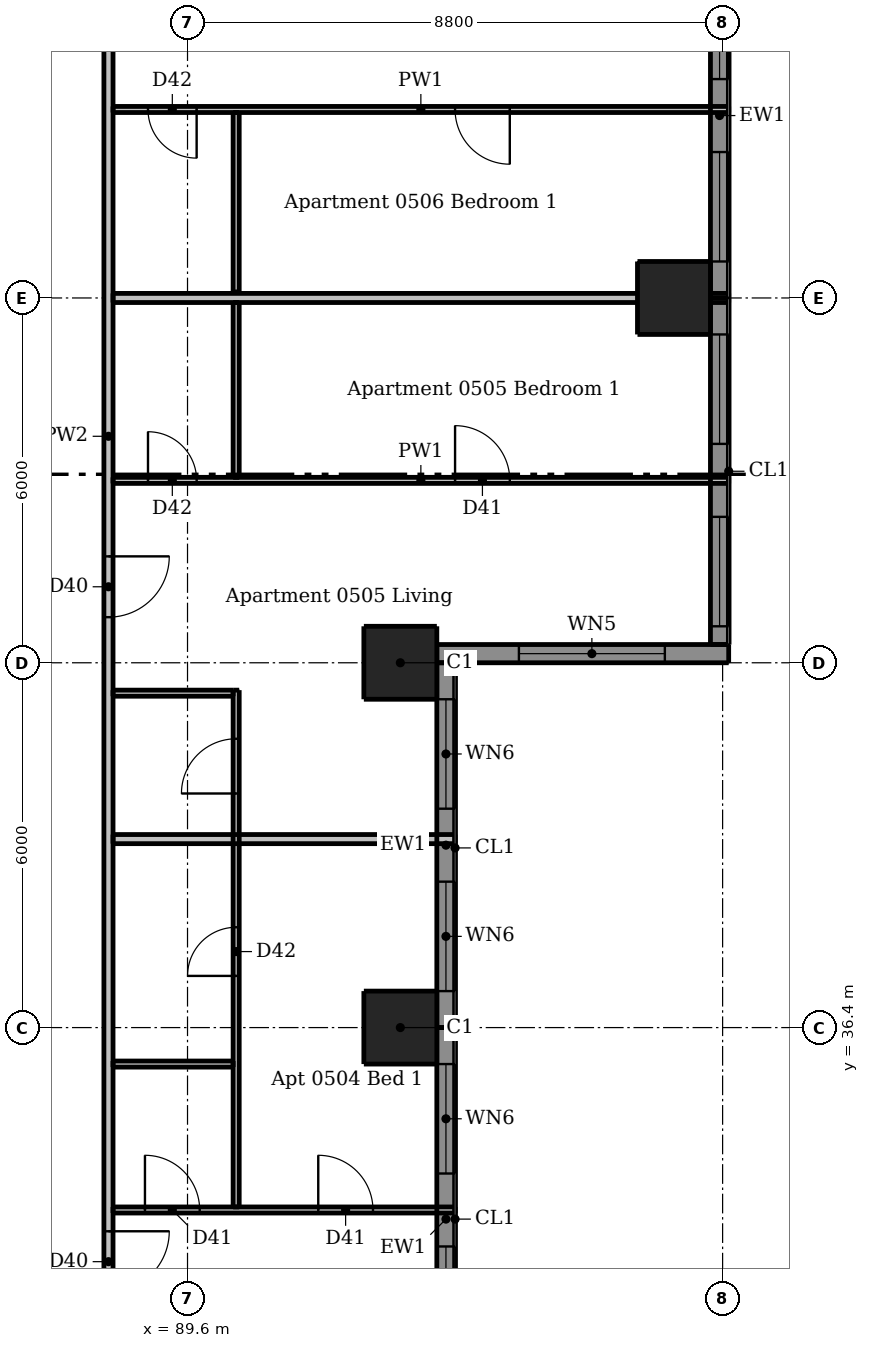
"""IFC4 building model, lengths in metres.
Left out: names, types, materials, properties, quantities, classifications, styles, units other than length and angle.
Written with IfcOpenShell. Run it as: python <this file> out.ifc"""

import sys

from ifc_helpers import new_model, si_unit, direction, frame, frame_2d, origin, origin_2d, place, context, subcontext, project, spatial, rectangle, extrude, element, fill, save


model = new_model("IFC4")
c1 = context("Model", 3, precision=1e-05, world=origin(), true_north=direction((0.0, 1.0)))
c2 = subcontext(c1, "Body", "Model", "MODEL_VIEW")
j1 = project(units=[si_unit("LENGTHUNIT", "METRE"), si_unit("PLANEANGLEUNIT", "RADIAN")], contexts=[c1])
p1 = place(None, origin())
s1 = spatial("IfcSite", under=j1, at=p1, CompositionType="ELEMENT")
p2 = place(p1, origin())
s2 = spatial("IfcBuilding", under=s1, at=p2, CompositionType="ELEMENT")
p3 = place(p2, frame((0.0, 0.0, 23.5)))
s3 = spatial("IfcBuildingStorey", under=s2, at=p3, CompositionType="ELEMENT", Elevation=23.5)
for number, where, z_axis, x_axis in (
    (1, (93.1, 36.4, 0.0), (0.0, 0.0, 1.0), (1.0, 0.0, 0.0)),
    (2, (93.1, 42.4, 0.0), (0.0, 0.0, 1.0), (1.0, 0.0, 0.0)),
    (3, (97.6, 48.4, 0.0), (0.0, 0.0, 1.0), (1.0, 0.0, 0.0)),
):
    element("IfcColumn", number, at=place(p3, frame(where, z_axis=z_axis, x_axis=x_axis)), inside=s3, PredefinedType="COLUMN", context=c2, shape_type="SweptSolid", body=[
        extrude(rectangle(XDim=1.2, YDim=1.2, at=origin_2d()), origin(), (0.0, 0.0, 1.0), 3.05),
    ])
p4 = place(p3, frame((93.7, 42.55, 0.0), z_axis=(0.0, 0.0, 1.0), x_axis=(1.0, 0.0, 0.0)))
e4 = element("IfcWall", 4, at=p4, inside=s3, PredefinedType="SOLIDWALL", context=c2, shape_type="SweptSolid", body=[
    extrude(rectangle(XDim=4.8, YDim=0.3, at=frame_2d((2.4, 0.0))), origin(), (0.0, 0.0, 1.0), 3.05),
])
p5 = place(p4, frame((1.35, 0.0, 0.15)))
e5 = element("IfcOpeningElement", 5, at=p5, cuts=e4, PredefinedType="OPENING", context=c2, shape_type="SweptSolid", body=[
    extrude(rectangle(XDim=2.4, YDim=2.1, at=frame_2d((1.2, 1.05))), frame((0.0, 0.16, 0.0), z_axis=(0.0, -1.0, 0.0), x_axis=(1.0, 0.0, 0.0)), (0.0, 0.0, 1.0), 0.32),
])
p6 = place(p3, frame((93.85, 30.1, 0.0), z_axis=(0.0, 0.0, 1.0), x_axis=(0.0, 1.0, 0.0)))
e6 = element("IfcWall", 6, at=p6, inside=s3, PredefinedType="SOLIDWALL", context=c2, shape_type="SweptSolid", body=[
    extrude(rectangle(XDim=6.3, YDim=0.3, at=frame_2d((3.15, 0.0))), origin(), (0.0, 0.0, 1.0), 3.05),
])
p7 = place(p6, frame((0.9, 0.0, 0.15)))
e7 = element("IfcOpeningElement", 7, at=p7, cuts=e6, PredefinedType="OPENING", context=c2, shape_type="SweptSolid", body=[
    extrude(rectangle(XDim=1.8, YDim=2.1, at=frame_2d((0.9, 1.05))), frame((0.0, 0.16, 0.0), z_axis=(0.0, -1.0, 0.0), x_axis=(1.0, 0.0, 0.0)), (0.0, 0.0, 1.0), 0.32),
])
p8 = place(p6, frame((3.9, 0.0, 0.15)))
e8 = element("IfcOpeningElement", 8, at=p8, cuts=e6, PredefinedType="OPENING", context=c2, shape_type="SweptSolid", body=[
    extrude(rectangle(XDim=1.8, YDim=2.1, at=frame_2d((0.9, 1.05))), frame((0.0, 0.16, 0.0), z_axis=(0.0, -1.0, 0.0), x_axis=(1.0, 0.0, 0.0)), (0.0, 0.0, 1.0), 0.32),
])
p9 = place(p3, frame((93.85, 36.4, 0.0), z_axis=(0.0, 0.0, 1.0), x_axis=(0.0, 1.0, 0.0)))
e9 = element("IfcWall", 9, at=p9, inside=s3, PredefinedType="SOLIDWALL", context=c2, shape_type="SweptSolid", body=[
    extrude(rectangle(XDim=6.0, YDim=0.3, at=frame_2d((3.0, 0.0))), origin(), (0.0, 0.0, 1.0), 3.05),
])
p10 = place(p9, frame((0.6, 0.0, 0.15)))
e10 = element("IfcOpeningElement", 10, at=p10, cuts=e9, PredefinedType="OPENING", context=c2, shape_type="SweptSolid", body=[
    extrude(rectangle(XDim=1.8, YDim=2.1, at=frame_2d((0.9, 1.05))), frame((0.0, 0.16, 0.0), z_axis=(0.0, -1.0, 0.0), x_axis=(1.0, 0.0, 0.0)), (0.0, 0.0, 1.0), 0.32),
])
p11 = place(p9, frame((3.6, 0.0, 0.15)))
e11 = element("IfcOpeningElement", 11, at=p11, cuts=e9, PredefinedType="OPENING", context=c2, shape_type="SweptSolid", body=[
    extrude(rectangle(XDim=1.8, YDim=2.1, at=frame_2d((0.9, 1.05))), frame((0.0, 0.16, 0.0), z_axis=(0.0, -1.0, 0.0), x_axis=(1.0, 0.0, 0.0)), (0.0, 0.0, 1.0), 0.32),
])
p12 = place(p3, frame((98.35, 42.7, 0.0), z_axis=(0.0, 0.0, 1.0), x_axis=(0.0, 1.0, 0.0)))
e12 = element("IfcWall", 12, at=p12, inside=s3, PredefinedType="SOLIDWALL", context=c2, shape_type="SweptSolid", body=[
    extrude(rectangle(XDim=5.7, YDim=0.3, at=frame_2d((2.85, 0.0))), origin(), (0.0, 0.0, 1.0), 3.05),
])
p13 = place(p12, frame((0.3, 0.0, 0.15)))
e13 = element("IfcOpeningElement", 13, at=p13, cuts=e12, PredefinedType="OPENING", context=c2, shape_type="SweptSolid", body=[
    extrude(rectangle(XDim=1.8, YDim=2.1, at=frame_2d((0.9, 1.05))), frame((0.0, 0.16, 0.0), z_axis=(0.0, -1.0, 0.0), x_axis=(1.0, 0.0, 0.0)), (0.0, 0.0, 1.0), 0.32),
])
p14 = place(p12, frame((3.3, 0.0, 0.15)))
e14 = element("IfcOpeningElement", 14, at=p14, cuts=e12, PredefinedType="OPENING", context=c2, shape_type="SweptSolid", body=[
    extrude(rectangle(XDim=1.8, YDim=2.1, at=frame_2d((0.9, 1.05))), frame((0.0, 0.16, 0.0), z_axis=(0.0, -1.0, 0.0), x_axis=(1.0, 0.0, 0.0)), (0.0, 0.0, 1.0), 0.32),
])
p15 = place(p3, frame((98.35, 48.4, 0.0), z_axis=(0.0, 0.0, 1.0), x_axis=(0.0, 1.0, 0.0)))
e15 = element("IfcWall", 15, at=p15, inside=s3, PredefinedType="SOLIDWALL", context=c2, shape_type="SweptSolid", body=[
    extrude(rectangle(XDim=6.0, YDim=0.3, at=frame_2d((3.0, 0.0))), origin(), (0.0, 0.0, 1.0), 3.05),
])
p16 = place(p15, frame((0.6, 0.0, 0.15)))
e16 = element("IfcOpeningElement", 16, at=p16, cuts=e15, PredefinedType="OPENING", context=c2, shape_type="SweptSolid", body=[
    extrude(rectangle(XDim=1.8, YDim=2.1, at=frame_2d((0.9, 1.05))), frame((0.0, 0.16, 0.0), z_axis=(0.0, -1.0, 0.0), x_axis=(1.0, 0.0, 0.0)), (0.0, 0.0, 1.0), 0.32),
])
p17 = place(p15, frame((3.6, 0.0, 0.15)))
e17 = element("IfcOpeningElement", 17, at=p17, cuts=e15, PredefinedType="OPENING", context=c2, shape_type="SweptSolid", body=[
    extrude(rectangle(XDim=1.8, YDim=2.1, at=frame_2d((0.9, 1.05))), frame((0.0, 0.16, 0.0), z_axis=(0.0, -1.0, 0.0), x_axis=(1.0, 0.0, 0.0)), (0.0, 0.0, 1.0), 0.32),
])
p18 = place(p3, frame((90.4, 33.45, 0.0), z_axis=(0.0, 0.0, 1.0), x_axis=(0.0, 1.0, 0.0)))
e18 = element("IfcWall", 18, at=p18, inside=s3, PredefinedType="PARTITIONING", context=c2, shape_type="SweptSolid", body=[
    extrude(rectangle(XDim=8.5, YDim=0.1, at=frame_2d((4.25, 0.0))), origin(), (0.0, 0.0, 1.0), 3.05),
])
p19 = place(p18, frame((3.8, 0.0, 0.0)))
e19 = element("IfcOpeningElement", 19, at=p19, cuts=e18, PredefinedType="OPENING", context=c2, shape_type="SweptSolid", body=[
    extrude(rectangle(XDim=0.8, YDim=2.1, at=frame_2d((0.4, 1.05))), frame((0.0, 0.06, 0.0), z_axis=(0.0, -1.0, 0.0), x_axis=(1.0, 0.0, 0.0)), (0.0, 0.0, 1.0), 0.12),
])
p20 = place(p18, frame((6.8, 0.0, 0.0)))
e20 = element("IfcOpeningElement", 20, at=p20, cuts=e18, PredefinedType="OPENING", context=c2, shape_type="SweptSolid", body=[
    extrude(rectangle(XDim=0.9, YDim=2.1, at=frame_2d((0.45, 1.05))), frame((0.0, 0.06, 0.0), z_axis=(0.0, -1.0, 0.0), x_axis=(1.0, 0.0, 0.0)), (0.0, 0.0, 1.0), 0.12),
])
p21 = place(p3, frame((90.4, 45.45, 0.0), z_axis=(0.0, 0.0, 1.0), x_axis=(0.0, 1.0, 0.0)))
e21 = element("IfcWall", 21, at=p21, inside=s3, PredefinedType="PARTITIONING", context=c2, shape_type="SweptSolid", body=[
    extrude(rectangle(XDim=2.875, YDim=0.1, at=frame_2d((1.438, 0.0))), origin(), (0.0, 0.0, 1.0), 3.05),
])
p22 = place(p3, frame((90.4, 48.5, 0.0), z_axis=(0.0, 0.0, 1.0), x_axis=(0.0, 1.0, 0.0)))
e22 = element("IfcWall", 22, at=p22, inside=s3, PredefinedType="PARTITIONING", context=c2, shape_type="SweptSolid", body=[
    extrude(rectangle(XDim=2.95, YDim=0.1, at=frame_2d((1.475, 0.0))), origin(), (0.0, 0.0, 1.0), 3.05),
])
p23 = place(p3, frame((98.5, 51.5, 0.0), z_axis=(0.0, 0.0, 1.0), x_axis=(-1.0, 0.0, 0.0)))
e23 = element("IfcWall", 23, at=p23, inside=s3, PredefinedType="PARTITIONING", context=c2, shape_type="SweptSolid", body=[
    extrude(rectangle(XDim=10.125, YDim=0.1, at=frame_2d((5.062, 0.0))), origin(), (0.0, 0.0, 1.0), 3.05),
])
p24 = place(p23, frame((3.6, 0.0, 0.0)))
e24 = element("IfcOpeningElement", 24, at=p24, cuts=e23, PredefinedType="OPENING", context=c2, shape_type="SweptSolid", body=[
    extrude(rectangle(XDim=0.9, YDim=2.1, at=frame_2d((0.45, 1.05))), frame((0.0, 0.06, 0.0), z_axis=(0.0, -1.0, 0.0), x_axis=(1.0, 0.0, 0.0)), (0.0, 0.0, 1.0), 0.12),
])
p25 = place(p23, frame((8.75, 0.0, 0.0)))
e25 = element("IfcOpeningElement", 25, at=p25, cuts=e23, PredefinedType="OPENING", context=c2, shape_type="SweptSolid", body=[
    extrude(rectangle(XDim=0.8, YDim=2.1, at=frame_2d((0.4, 1.05))), frame((0.0, 0.06, 0.0), z_axis=(0.0, -1.0, 0.0), x_axis=(1.0, 0.0, 0.0)), (0.0, 0.0, 1.0), 0.12),
])
p26 = place(p3, frame((88.375, 45.4, 0.0), z_axis=(0.0, 0.0, 1.0), x_axis=(1.0, 0.0, 0.0)))
e26 = element("IfcWall", 26, at=p26, inside=s3, PredefinedType="PARTITIONING", context=c2, shape_type="SweptSolid", body=[
    extrude(rectangle(XDim=10.125, YDim=0.1, at=frame_2d((5.062, 0.0))), origin(), (0.0, 0.0, 1.0), 3.05),
])
p27 = place(p26, frame((5.625, 0.0, 0.0)))
e27 = element("IfcOpeningElement", 27, at=p27, cuts=e26, PredefinedType="OPENING", context=c2, shape_type="SweptSolid", body=[
    extrude(rectangle(XDim=0.9, YDim=2.1, at=frame_2d((0.45, 1.05))), frame((0.0, 0.06, 0.0), z_axis=(0.0, -1.0, 0.0), x_axis=(1.0, 0.0, 0.0)), (0.0, 0.0, 1.0), 0.12),
])
p28 = place(p26, frame((0.575, 0.0, 0.0)))
e28 = element("IfcOpeningElement", 28, at=p28, cuts=e26, PredefinedType="OPENING", context=c2, shape_type="SweptSolid", body=[
    extrude(rectangle(XDim=0.8, YDim=2.1, at=frame_2d((0.4, 1.05))), frame((0.0, 0.06, 0.0), z_axis=(0.0, -1.0, 0.0), x_axis=(1.0, 0.0, 0.0)), (0.0, 0.0, 1.0), 0.12),
])
for number, where, z_axis, x_axis in (
    (29, (88.375, 41.9, 0.0), (0.0, 0.0, 1.0), (1.0, 0.0, 0.0)),
    (30, (88.375, 35.8, 0.0), (0.0, 0.0, 1.0), (1.0, 0.0, 0.0)),
):
    element("IfcWall", number, at=place(p3, frame(where, z_axis=z_axis, x_axis=x_axis)), inside=s3, PredefinedType="PARTITIONING", context=c2, shape_type="SweptSolid", body=[
        extrude(rectangle(XDim=1.975, YDim=0.1, at=frame_2d((0.988, 0.0))), origin(), (0.0, 0.0, 1.0), 3.05),
    ])
p29 = place(p3, frame((88.375, 33.4, 0.0), z_axis=(0.0, 0.0, 1.0), x_axis=(1.0, 0.0, 0.0)))
e31 = element("IfcWall", 31, at=p29, inside=s3, PredefinedType="PARTITIONING", context=c2, shape_type="SweptSolid", body=[
    extrude(rectangle(XDim=5.625, YDim=0.1, at=frame_2d((2.812, 0.0))), origin(), (0.0, 0.0, 1.0), 3.05),
])
p30 = place(p29, frame((0.525, 0.0, 0.0)))
e32 = element("IfcOpeningElement", 32, at=p30, cuts=e31, PredefinedType="OPENING", context=c2, shape_type="SweptSolid", body=[
    extrude(rectangle(XDim=0.9, YDim=2.1, at=frame_2d((0.45, 1.05))), frame((0.0, 0.06, 0.0), z_axis=(0.0, -1.0, 0.0), x_axis=(1.0, 0.0, 0.0)), (0.0, 0.0, 1.0), 0.12),
])
p31 = place(p29, frame((3.375, 0.0, 0.0)))
e33 = element("IfcOpeningElement", 33, at=p31, cuts=e31, PredefinedType="OPENING", context=c2, shape_type="SweptSolid", body=[
    extrude(rectangle(XDim=0.9, YDim=2.1, at=frame_2d((0.45, 1.05))), frame((0.0, 0.06, 0.0), z_axis=(0.0, -1.0, 0.0), x_axis=(1.0, 0.0, 0.0)), (0.0, 0.0, 1.0), 0.12),
])
p32 = place(p3, frame((88.3, 60.475, 0.0), z_axis=(0.0, 0.0, 1.0), x_axis=(0.0, -1.0, 0.0)))
e34 = element("IfcWall", 34, at=p32, inside=s3, PredefinedType="PARTITIONING", context=c2, shape_type="SweptSolid", body=[
    extrude(rectangle(XDim=28.7, YDim=0.15, at=frame_2d((14.35, 0.0))), origin(), (0.0, 0.0, 1.0), 3.05),
])
p33 = place(p32, frame((27.425, 0.0, 0.0)))
e35 = element("IfcOpeningElement", 35, at=p33, cuts=e34, PredefinedType="OPENING", context=c2, shape_type="SweptSolid", body=[
    extrude(rectangle(XDim=1.0, YDim=2.1, at=frame_2d((0.5, 1.05))), frame((0.0, 0.085, 0.0), z_axis=(0.0, -1.0, 0.0), x_axis=(1.0, 0.0, 0.0)), (0.0, 0.0, 1.0), 0.17),
])
p34 = place(p32, frame((16.325, 0.0, 0.0)))
e36 = element("IfcOpeningElement", 36, at=p34, cuts=e34, PredefinedType="OPENING", context=c2, shape_type="SweptSolid", body=[
    extrude(rectangle(XDim=1.0, YDim=2.1, at=frame_2d((0.5, 1.05))), frame((0.0, 0.085, 0.0), z_axis=(0.0, -1.0, 0.0), x_axis=(1.0, 0.0, 0.0)), (0.0, 0.0, 1.0), 0.17),
])
p35 = place(p32, frame((5.525, 0.0, 0.0)))
e37 = element("IfcOpeningElement", 37, at=p35, cuts=e34, PredefinedType="OPENING", context=c2, shape_type="SweptSolid", body=[
    extrude(rectangle(XDim=1.0, YDim=2.1, at=frame_2d((0.5, 1.05))), frame((0.0, 0.085, 0.0), z_axis=(0.0, -1.0, 0.0), x_axis=(1.0, 0.0, 0.0)), (0.0, 0.0, 1.0), 0.17),
])
p36 = place(p3, frame((88.375, 48.4, 0.0), z_axis=(0.0, 0.0, 1.0), x_axis=(1.0, 0.0, 0.0)))
e38 = element("IfcWall", 38, at=p36, inside=s3, PredefinedType="PARTITIONING", context=c2, shape_type="SweptSolid", body=[
    extrude(rectangle(XDim=10.125, YDim=0.15, at=frame_2d((5.062, 0.0))), origin(), (0.0, 0.0, 1.0), 2.516),
])
p37 = place(p3, frame((88.375, 39.5, 0.0), z_axis=(0.0, 0.0, 1.0), x_axis=(1.0, 0.0, 0.0)))
e39 = element("IfcWall", 39, at=p37, inside=s3, PredefinedType="PARTITIONING", context=c2, shape_type="SweptSolid", body=[
    extrude(rectangle(XDim=5.625, YDim=0.15, at=frame_2d((2.812, 0.0))), origin(), (0.0, 0.0, 1.0), 3.05),
])
p38 = place(p5, origin())
e40 = element("IfcWindow", 40, at=p38, inside=s3, PartitioningType="DOUBLE_PANEL_VERTICAL", PredefinedType="WINDOW", context=c2, shape_type="SweptSolid", body=[
    extrude(rectangle(XDim=2.4, YDim=2.1, at=frame_2d((1.2, 1.05))), frame((0.0, 0.03, 0.0), z_axis=(0.0, -1.0, 0.0), x_axis=(1.0, 0.0, 0.0)), (0.0, 0.0, 1.0), 0.06),
])
fill(e5, e40)
p39 = place(p7, origin())
e41 = element("IfcWindow", 41, at=p39, inside=s3, PartitioningType="DOUBLE_PANEL_VERTICAL", PredefinedType="WINDOW", context=c2, shape_type="SweptSolid", body=[
    extrude(rectangle(XDim=1.8, YDim=2.1, at=frame_2d((0.9, 1.05))), frame((0.0, 0.03, 0.0), z_axis=(0.0, -1.0, 0.0), x_axis=(1.0, 0.0, 0.0)), (0.0, 0.0, 1.0), 0.06),
])
fill(e7, e41)
p40 = place(p8, origin())
e42 = element("IfcWindow", 42, at=p40, inside=s3, PartitioningType="DOUBLE_PANEL_VERTICAL", PredefinedType="WINDOW", context=c2, shape_type="SweptSolid", body=[
    extrude(rectangle(XDim=1.8, YDim=2.1, at=frame_2d((0.9, 1.05))), frame((0.0, 0.03, 0.0), z_axis=(0.0, -1.0, 0.0), x_axis=(1.0, 0.0, 0.0)), (0.0, 0.0, 1.0), 0.06),
])
fill(e8, e42)
p41 = place(p10, origin())
e43 = element("IfcWindow", 43, at=p41, inside=s3, PartitioningType="DOUBLE_PANEL_VERTICAL", PredefinedType="WINDOW", context=c2, shape_type="SweptSolid", body=[
    extrude(rectangle(XDim=1.8, YDim=2.1, at=frame_2d((0.9, 1.05))), frame((0.0, 0.03, 0.0), z_axis=(0.0, -1.0, 0.0), x_axis=(1.0, 0.0, 0.0)), (0.0, 0.0, 1.0), 0.06),
])
fill(e10, e43)
p42 = place(p11, origin())
e44 = element("IfcWindow", 44, at=p42, inside=s3, PartitioningType="DOUBLE_PANEL_VERTICAL", PredefinedType="WINDOW", context=c2, shape_type="SweptSolid", body=[
    extrude(rectangle(XDim=1.8, YDim=2.1, at=frame_2d((0.9, 1.05))), frame((0.0, 0.03, 0.0), z_axis=(0.0, -1.0, 0.0), x_axis=(1.0, 0.0, 0.0)), (0.0, 0.0, 1.0), 0.06),
])
fill(e11, e44)
p43 = place(p13, origin())
e45 = element("IfcWindow", 45, at=p43, inside=s3, PartitioningType="DOUBLE_PANEL_VERTICAL", PredefinedType="WINDOW", context=c2, shape_type="SweptSolid", body=[
    extrude(rectangle(XDim=1.8, YDim=2.1, at=frame_2d((0.9, 1.05))), frame((0.0, 0.03, 0.0), z_axis=(0.0, -1.0, 0.0), x_axis=(1.0, 0.0, 0.0)), (0.0, 0.0, 1.0), 0.06),
])
fill(e13, e45)
p44 = place(p14, origin())
e46 = element("IfcWindow", 46, at=p44, inside=s3, PartitioningType="DOUBLE_PANEL_VERTICAL", PredefinedType="WINDOW", context=c2, shape_type="SweptSolid", body=[
    extrude(rectangle(XDim=1.8, YDim=2.1, at=frame_2d((0.9, 1.05))), frame((0.0, 0.03, 0.0), z_axis=(0.0, -1.0, 0.0), x_axis=(1.0, 0.0, 0.0)), (0.0, 0.0, 1.0), 0.06),
])
fill(e14, e46)
p45 = place(p16, origin())
e47 = element("IfcWindow", 47, at=p45, inside=s3, PartitioningType="DOUBLE_PANEL_VERTICAL", PredefinedType="WINDOW", context=c2, shape_type="SweptSolid", body=[
    extrude(rectangle(XDim=1.8, YDim=2.1, at=frame_2d((0.9, 1.05))), frame((0.0, 0.03, 0.0), z_axis=(0.0, -1.0, 0.0), x_axis=(1.0, 0.0, 0.0)), (0.0, 0.0, 1.0), 0.06),
])
fill(e16, e47)
p46 = place(p17, origin())
e48 = element("IfcWindow", 48, at=p46, inside=s3, PartitioningType="DOUBLE_PANEL_VERTICAL", PredefinedType="WINDOW", context=c2, shape_type="SweptSolid", body=[
    extrude(rectangle(XDim=1.8, YDim=2.1, at=frame_2d((0.9, 1.05))), frame((0.0, 0.03, 0.0), z_axis=(0.0, -1.0, 0.0), x_axis=(1.0, 0.0, 0.0)), (0.0, 0.0, 1.0), 0.06),
])
fill(e17, e48)
p47 = place(p33, origin())
e49 = element("IfcDoor", 49, at=p47, inside=s3, OperationType="SINGLE_SWING_LEFT", PredefinedType="DOOR", context=c2, shape_type="SweptSolid", body=[
    extrude(rectangle(XDim=1.0, YDim=2.1, at=frame_2d((0.5, 1.05))), frame((0.0, 0.025, 0.0), z_axis=(0.0, -1.0, 0.0), x_axis=(1.0, 0.0, 0.0)), (0.0, 0.0, 1.0), 0.05),
])
fill(e35, e49)
p48 = place(p30, origin())
e50 = element("IfcDoor", 50, at=p48, inside=s3, OperationType="SINGLE_SWING_LEFT", PredefinedType="DOOR", context=c2, shape_type="SweptSolid", body=[
    extrude(rectangle(XDim=0.9, YDim=2.1, at=frame_2d((0.45, 1.05))), frame((0.0, 0.025, 0.0), z_axis=(0.0, -1.0, 0.0), x_axis=(1.0, 0.0, 0.0)), (0.0, 0.0, 1.0), 0.05),
])
fill(e32, e50)
p49 = place(p31, origin())
e51 = element("IfcDoor", 51, at=p49, inside=s3, OperationType="SINGLE_SWING_LEFT", PredefinedType="DOOR", context=c2, shape_type="SweptSolid", body=[
    extrude(rectangle(XDim=0.9, YDim=2.1, at=frame_2d((0.45, 1.05))), frame((0.0, 0.025, 0.0), z_axis=(0.0, -1.0, 0.0), x_axis=(1.0, 0.0, 0.0)), (0.0, 0.0, 1.0), 0.05),
])
fill(e33, e51)
p50 = place(p19, origin())
e52 = element("IfcDoor", 52, at=p50, inside=s3, OperationType="SINGLE_SWING_LEFT", PredefinedType="DOOR", context=c2, shape_type="SweptSolid", body=[
    extrude(rectangle(XDim=0.8, YDim=2.1, at=frame_2d((0.4, 1.05))), frame((0.0, 0.025, 0.0), z_axis=(0.0, -1.0, 0.0), x_axis=(1.0, 0.0, 0.0)), (0.0, 0.0, 1.0), 0.05),
])
fill(e19, e52)
p51 = place(p34, origin())
e53 = element("IfcDoor", 53, at=p51, inside=s3, OperationType="SINGLE_SWING_LEFT", PredefinedType="DOOR", context=c2, shape_type="SweptSolid", body=[
    extrude(rectangle(XDim=1.0, YDim=2.1, at=frame_2d((0.5, 1.05))), frame((0.0, 0.025, 0.0), z_axis=(0.0, -1.0, 0.0), x_axis=(1.0, 0.0, 0.0)), (0.0, 0.0, 1.0), 0.05),
])
fill(e36, e53)
p52 = place(p20, origin())
e54 = element("IfcDoor", 54, at=p52, inside=s3, OperationType="SINGLE_SWING_LEFT", PredefinedType="DOOR", context=c2, shape_type="SweptSolid", body=[
    extrude(rectangle(XDim=0.9, YDim=2.1, at=frame_2d((0.45, 1.05))), frame((0.0, 0.025, 0.0), z_axis=(0.0, -1.0, 0.0), x_axis=(1.0, 0.0, 0.0)), (0.0, 0.0, 1.0), 0.05),
])
fill(e20, e54)
p53 = place(p27, origin())
e55 = element("IfcDoor", 55, at=p53, inside=s3, OperationType="SINGLE_SWING_LEFT", PredefinedType="DOOR", context=c2, shape_type="SweptSolid", body=[
    extrude(rectangle(XDim=0.9, YDim=2.1, at=frame_2d((0.45, 1.05))), frame((0.0, 0.025, 0.0), z_axis=(0.0, -1.0, 0.0), x_axis=(1.0, 0.0, 0.0)), (0.0, 0.0, 1.0), 0.05),
])
fill(e27, e55)
p54 = place(p28, origin())
e56 = element("IfcDoor", 56, at=p54, inside=s3, OperationType="SINGLE_SWING_LEFT", PredefinedType="DOOR", context=c2, shape_type="SweptSolid", body=[
    extrude(rectangle(XDim=0.8, YDim=2.1, at=frame_2d((0.4, 1.05))), frame((0.0, 0.025, 0.0), z_axis=(0.0, -1.0, 0.0), x_axis=(1.0, 0.0, 0.0)), (0.0, 0.0, 1.0), 0.05),
])
fill(e28, e56)
p55 = place(p24, origin())
e57 = element("IfcDoor", 57, at=p55, inside=s3, OperationType="SINGLE_SWING_LEFT", PredefinedType="DOOR", context=c2, shape_type="SweptSolid", body=[
    extrude(rectangle(XDim=0.9, YDim=2.1, at=frame_2d((0.45, 1.05))), frame((0.0, 0.025, 0.0), z_axis=(0.0, -1.0, 0.0), x_axis=(1.0, 0.0, 0.0)), (0.0, 0.0, 1.0), 0.05),
])
fill(e24, e57)
p56 = place(p25, origin())
e58 = element("IfcDoor", 58, at=p56, inside=s3, OperationType="SINGLE_SWING_LEFT", PredefinedType="DOOR", context=c2, shape_type="SweptSolid", body=[
    extrude(rectangle(XDim=0.8, YDim=2.1, at=frame_2d((0.4, 1.05))), frame((0.0, 0.025, 0.0), z_axis=(0.0, -1.0, 0.0), x_axis=(1.0, 0.0, 0.0)), (0.0, 0.0, 1.0), 0.05),
])
fill(e25, e58)
save(model, sys.argv[1])
